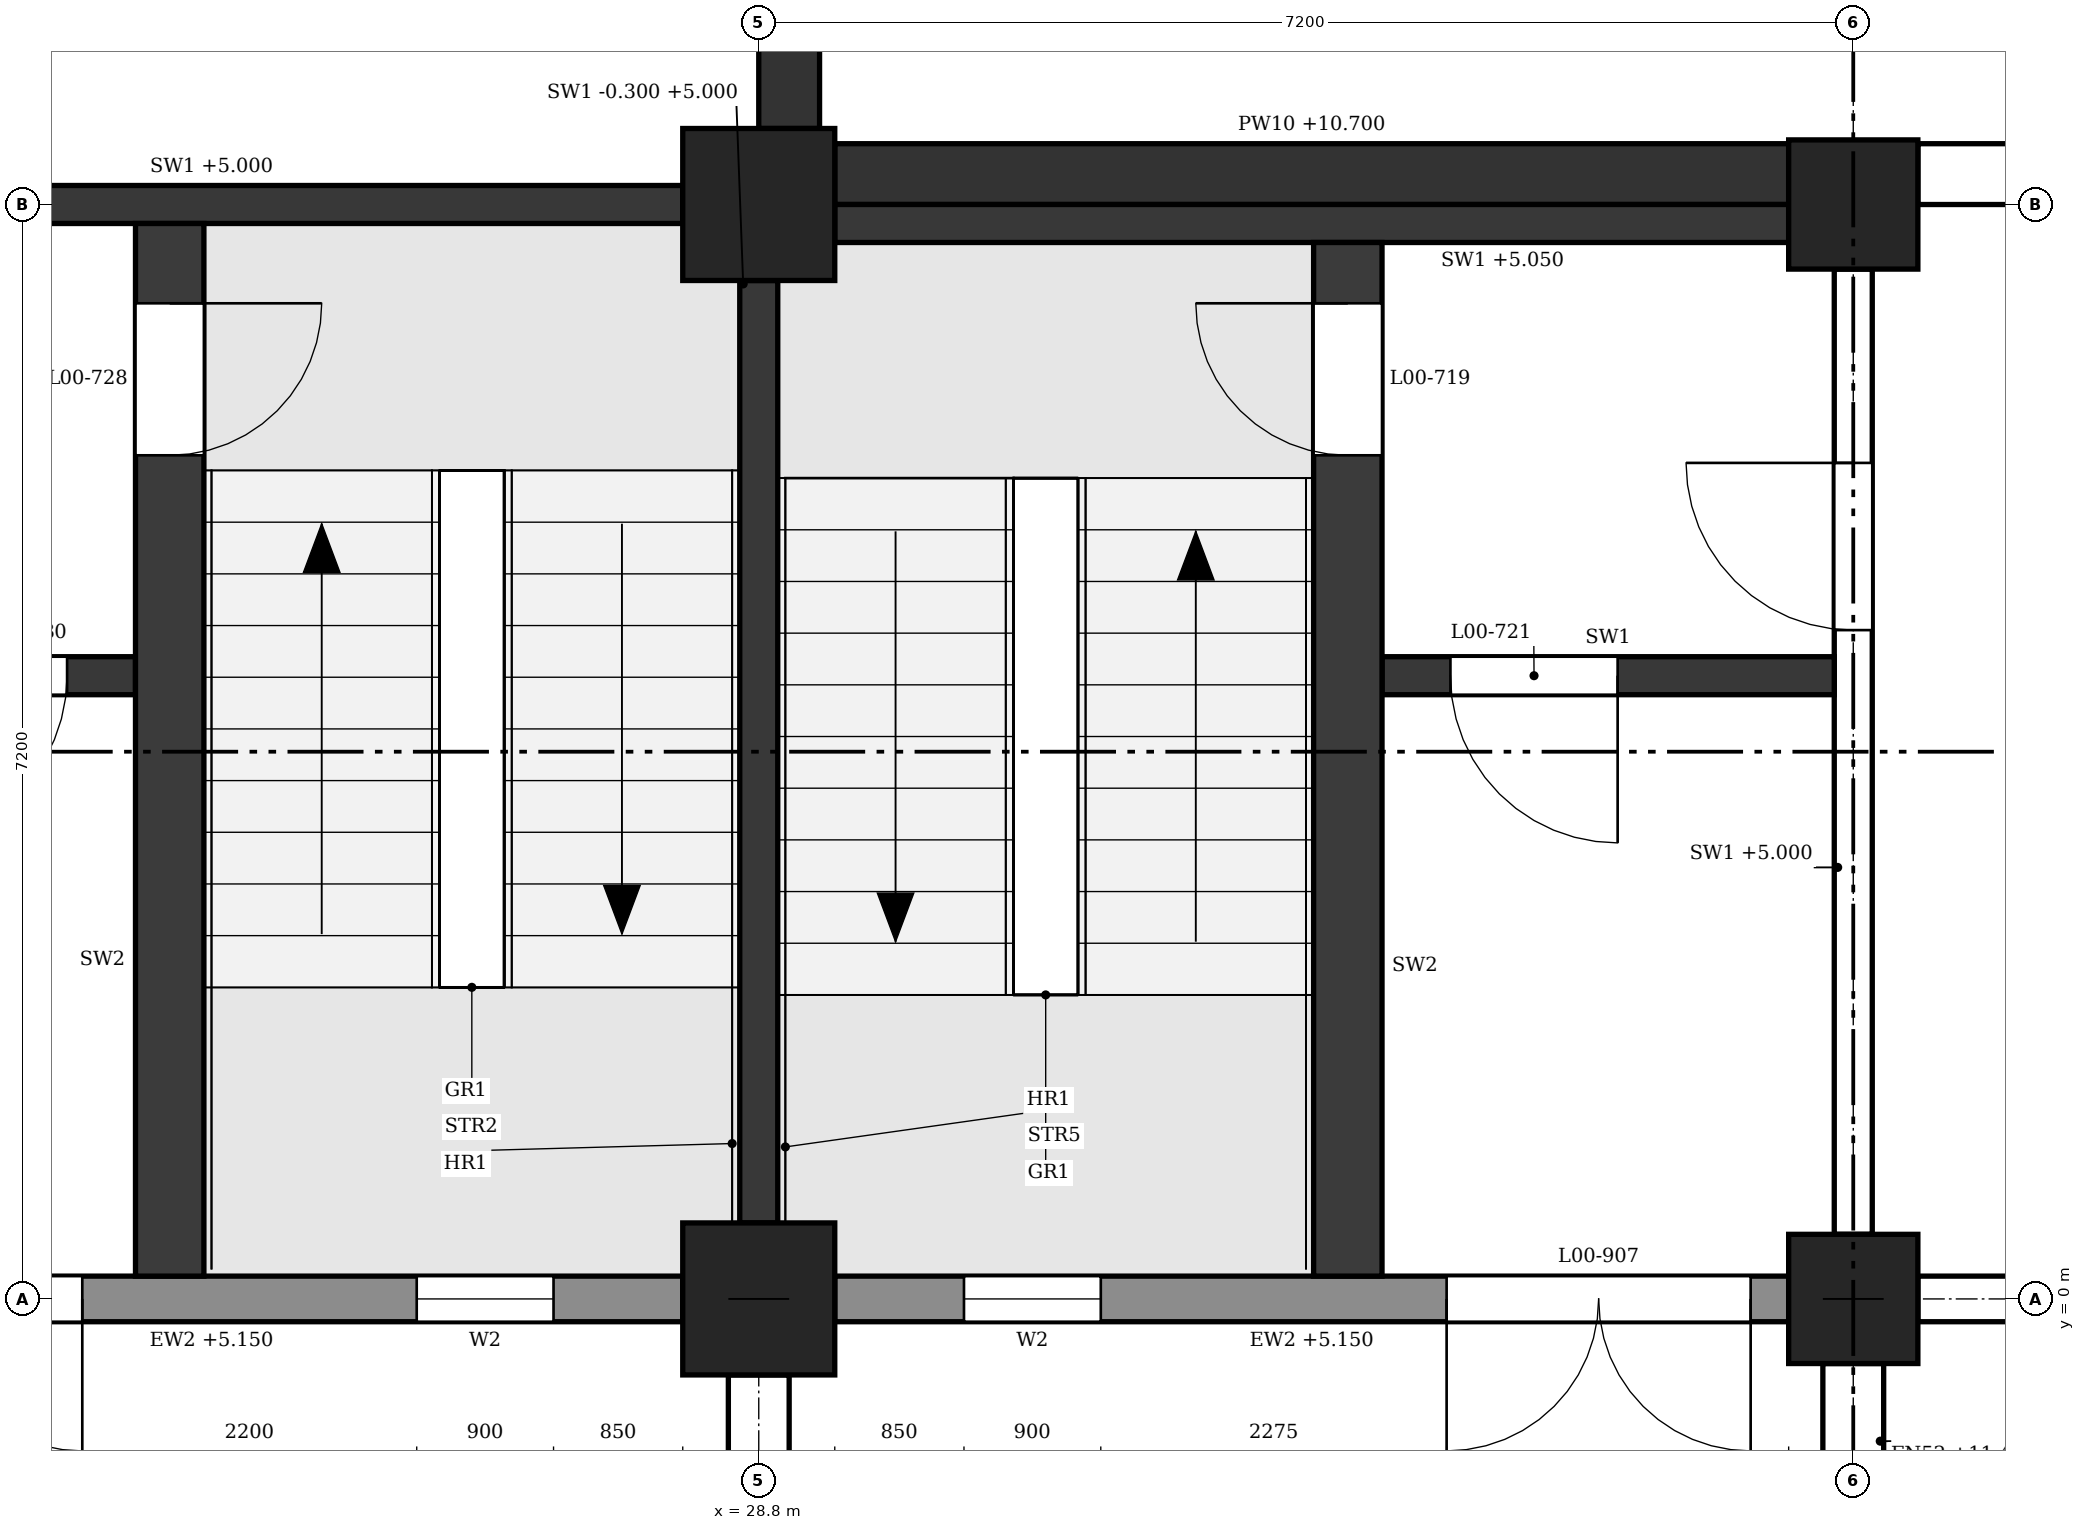
"""IFC4 building model, lengths in metres.
Left out: names, types, materials, properties, quantities, classifications, styles, units other than length and angle.
Written with IfcOpenShell. Run it as: python <this file> out.ifc"""

import sys

from ifc_helpers import new_model, si_unit, direction, frame, frame_2d, origin, origin_2d, place, context, subcontext, project, spatial, polyline, rectangle, outline, extrude, element, fill, save


model = new_model("IFC4")
c1 = context("Model", 3, precision=1e-05, world=origin(), true_north=direction((0.0, 1.0)))
c2 = subcontext(c1, "Body", "Model", "MODEL_VIEW")
j1 = project(units=[si_unit("LENGTHUNIT", "METRE"), si_unit("PLANEANGLEUNIT", "RADIAN")], contexts=[c1])
p1 = place(None, origin())
s1 = spatial("IfcSite", under=j1, at=p1, CompositionType="ELEMENT")
p2 = place(p1, origin())
s2 = spatial("IfcBuilding", under=s1, at=p2, CompositionType="ELEMENT")
p3 = place(p2, origin())
s3 = spatial("IfcBuildingStorey", under=s2, at=p3, CompositionType="ELEMENT", Elevation=0.0)
for number, where, z_axis, x_axis in (
    (1, (28.8, 0.0, 0.0), (0.0, 0.0, 1.0), (1.0, 0.0, 0.0)),
    (2, (28.8, 7.2, 0.0), (0.0, 0.0, 1.0), (1.0, 0.0, 0.0)),
):
    element("IfcColumn", number, at=place(p3, frame(where, z_axis=z_axis, x_axis=x_axis)), inside=s3, PredefinedType="COLUMN", context=c2, shape_type="SweptSolid", body=[
        extrude(rectangle(XDim=1.0, YDim=1.0, at=origin_2d()), origin(), (0.0, 0.0, 1.0), 6.0),
    ])
for number, where, z_axis, x_axis in (
    (3, (36.0, 0.0, 0.0), (0.0, 0.0, 1.0), (1.0, 0.0, 0.0)),
    (4, (36.0, 7.2, 0.0), (0.0, 0.0, 1.0), (1.0, 0.0, 0.0)),
):
    element("IfcColumn", number, at=place(p3, frame(where, z_axis=z_axis, x_axis=x_axis)), inside=s3, PredefinedType="COLUMN", context=c2, shape_type="SweptSolid", body=[
        extrude(rectangle(XDim=0.85, YDim=0.85, at=origin_2d()), origin(), (0.0, 0.0, 1.0), 6.0),
    ])
p4 = place(p3, frame((22.1, 0.0, 0.0), z_axis=(0.0, 0.0, 1.0), x_axis=(1.0, 0.0, 0.0)))
e5 = element("IfcWall", 5, at=p4, inside=s3, PredefinedType="STANDARD", context=c2, shape_type="SweptSolid", body=[
    extrude(rectangle(XDim=6.2, YDim=0.3, at=frame_2d((3.1, 0.0))), origin(), (0.0, 0.0, 1.0), 5.15),
])
p5 = place(p4, frame((0.25, 0.0, 0.0)))
e6 = element("IfcOpeningElement", 6, at=p5, cuts=e5, PredefinedType="OPENING", context=c2, shape_type="SweptSolid", body=[
    extrude(rectangle(XDim=2.0, YDim=2.1, at=frame_2d((1.0, 1.05))), frame((0.0, 0.16, 0.0), z_axis=(0.0, -1.0, 0.0), x_axis=(1.0, 0.0, 0.0)), (0.0, 0.0, 1.0), 0.32),
])
p6 = place(p4, frame((4.45, 0.0, 0.9)))
e7 = element("IfcOpeningElement", 7, at=p6, cuts=e5, PredefinedType="OPENING", context=c2, shape_type="SweptSolid", body=[
    extrude(outline(polyline([(0.0, 0.0), (0.9, 0.0), (0.9, 3.55), (0.45, 4.0), (0.0, 3.55), (0.0, 0.0)])), frame((0.0, 0.16, 0.0), z_axis=(0.0, -1.0, 0.0), x_axis=(1.0, 0.0, 0.0)), (0.0, 0.0, 1.0), 0.32),
])
p7 = place(p3, frame((29.3, 0.0, 0.0), z_axis=(0.0, 0.0, 1.0), x_axis=(1.0, 0.0, 0.0)))
e8 = element("IfcWall", 8, at=p7, inside=s3, PredefinedType="STANDARD", context=c2, shape_type="SweptSolid", body=[
    extrude(rectangle(XDim=6.275, YDim=0.3, at=frame_2d((3.137, 0.0))), origin(), (0.0, 0.0, 1.0), 5.15),
])
p8 = place(p7, frame((4.025, 0.0, 0.0)))
e9 = element("IfcOpeningElement", 9, at=p8, cuts=e8, PredefinedType="OPENING", context=c2, shape_type="SweptSolid", body=[
    extrude(rectangle(XDim=2.0, YDim=2.1, at=frame_2d((1.0, 1.05))), frame((0.0, 0.16, 0.0), z_axis=(0.0, -1.0, 0.0), x_axis=(1.0, 0.0, 0.0)), (0.0, 0.0, 1.0), 0.32),
])
p9 = place(p7, frame((0.85, 0.0, 0.9)))
e10 = element("IfcOpeningElement", 10, at=p9, cuts=e8, PredefinedType="OPENING", context=c2, shape_type="SweptSolid", body=[
    extrude(outline(polyline([(0.0, 0.0), (0.9, 0.0), (0.9, 3.55), (0.45, 4.0), (0.0, 3.55), (0.0, 0.0)])), frame((0.0, 0.16, 0.0), z_axis=(0.0, -1.0, 0.0), x_axis=(1.0, 0.0, 0.0)), (0.0, 0.0, 1.0), 0.32),
])
p10 = place(p3, frame((36.425, 0.0, 0.0), z_axis=(0.0, 0.0, 1.0), x_axis=(1.0, 0.0, 0.0)))
e11 = element("IfcWall", 11, at=p10, inside=s3, PredefinedType="STANDARD", context=c2, shape_type="SweptSolid", body=[
    extrude(rectangle(XDim=6.35, YDim=0.3, at=frame_2d((3.175, 0.0))), origin(), (0.0, 0.0, 1.0), 5.15),
])
p11 = place(p10, frame((1.975, 0.0, 0.0)))
e12 = element("IfcOpeningElement", 12, at=p11, cuts=e11, PredefinedType="OPENING", context=c2, shape_type="SweptSolid", body=[
    extrude(outline(polyline([(0.0, 0.0), (2.4, 0.0), (2.4, 2.0), (1.2, 3.2), (0.0, 2.0), (0.0, 0.0)])), frame((0.0, 0.16, 0.0), z_axis=(0.0, -1.0, 0.0), x_axis=(1.0, 0.0, 0.0)), (0.0, 0.0, 1.0), 0.32),
])
p12 = place(p3, frame((28.8, -0.5, 0.0), z_axis=(0.0, 0.0, 1.0), x_axis=(0.0, -1.0, 0.0)))
e13 = element("IfcWall", 13, at=p12, inside=s3, PredefinedType="POLYGONAL", context=c2, shape_type="SweptSolid", body=[
    extrude(outline(polyline([(1.2, 0.0), (1.2, 20.825), (0.85, 21.35), (0.0, 21.35), (0.0, 0.0), (1.2, 0.0)])), frame((0.0, 0.2, 0.0), z_axis=(0.0, -1.0, 0.0), x_axis=(1.0, 0.0, 0.0)), (0.0, 0.0, 1.0), 0.4),
])
p13 = place(p3, frame((36.0, -0.425, 0.0), z_axis=(0.0, 0.0, 1.0), x_axis=(0.0, -1.0, 0.0)))
e14 = element("IfcWall", 14, at=p13, inside=s3, PredefinedType="POLYGONAL", context=c2, shape_type="SweptSolid", body=[
    extrude(outline(polyline([(1.2, 0.0), (1.2, 9.825), (0.15, 11.4), (0.0, 11.4), (0.0, 0.0), (1.2, 0.0)])), frame((0.0, 0.2, 0.0), z_axis=(0.0, -1.0, 0.0), x_axis=(1.0, 0.0, 0.0)), (0.0, 0.0, 1.0), 0.4),
])
p14 = place(p3, frame((29.3, 7.075, 0.0), z_axis=(0.0, 0.0, 1.0), x_axis=(1.0, 0.0, 0.0)))
e15 = element("IfcWall", 15, at=p14, inside=s3, PredefinedType="SHEAR", context=c2, shape_type="SweptSolid", body=[
    extrude(rectangle(XDim=6.275, YDim=0.25, at=frame_2d((3.137, 0.0))), origin(), (0.0, 0.0, 1.0), 5.05),
])
p15 = place(p3, frame((28.8, 0.5, -0.3), z_axis=(0.0, 0.0, 1.0), x_axis=(0.0, 1.0, 0.0)))
e16 = element("IfcWall", 16, at=p15, inside=s3, PredefinedType="SHEAR", context=c2, shape_type="SweptSolid", body=[
    extrude(rectangle(XDim=6.2, YDim=0.25, at=frame_2d((3.1, 0.0))), origin(), (0.0, 0.0, 1.0), 5.3),
])
p16 = place(p3, frame((36.0, 0.425, 0.0), z_axis=(0.0, 0.0, 1.0), x_axis=(0.0, 1.0, 0.0)))
e17 = element("IfcWall", 17, at=p16, inside=s3, PredefinedType="SHEAR", context=c2, shape_type="SweptSolid", body=[
    extrude(rectangle(XDim=6.35, YDim=0.25, at=frame_2d((3.175, 0.0))), origin(), (0.0, 0.0, 1.0), 5.0),
])
p17 = place(p16, frame((3.975, 0.0, 0.0)))
e18 = element("IfcOpeningElement", 18, at=p17, cuts=e17, PredefinedType="OPENING", context=c2, shape_type="SweptSolid", body=[
    extrude(rectangle(XDim=1.1, YDim=2.1, at=frame_2d((0.55, 1.05))), frame((0.0, 0.135, 0.0), z_axis=(0.0, -1.0, 0.0), x_axis=(1.0, 0.0, 0.0)), (0.0, 0.0, 1.0), 0.27),
])
p18 = place(p3, frame((32.675, 0.15, 0.0), z_axis=(0.0, 0.0, 1.0), x_axis=(0.0, 1.0, 0.0)))
e19 = element("IfcWall", 19, at=p18, inside=s3, PredefinedType="SHEAR", context=c2, shape_type="SweptSolid", body=[
    extrude(rectangle(XDim=6.8, YDim=0.45, at=frame_2d((3.4, 0.0))), origin(), (0.0, 0.0, 1.0), 5.75),
])
p19 = place(p18, frame((5.4, 0.0, 0.0)))
e20 = element("IfcOpeningElement", 20, at=p19, cuts=e19, PredefinedType="OPENING", context=c2, shape_type="SweptSolid", body=[
    extrude(rectangle(XDim=1.0, YDim=2.1, at=frame_2d((0.5, 1.05))), frame((0.0, 0.235, 0.0), z_axis=(0.0, -1.0, 0.0), x_axis=(1.0, 0.0, 0.0)), (0.0, 0.0, 1.0), 0.47),
])
p20 = place(p3, frame((32.9, 4.1, 0.0), z_axis=(0.0, 0.0, 1.0), x_axis=(1.0, 0.0, 0.0)))
e21 = element("IfcWall", 21, at=p20, inside=s3, PredefinedType="SHEAR", context=c2, shape_type="SweptSolid", body=[
    extrude(rectangle(XDim=2.975, YDim=0.25, at=frame_2d((1.488, 0.0))), origin(), (0.0, 0.0, 1.0), 5.75),
])
p21 = place(p20, frame((0.45, 0.0, 0.0)))
e22 = element("IfcOpeningElement", 22, at=p21, cuts=e21, PredefinedType="OPENING", context=c2, shape_type="SweptSolid", body=[
    extrude(rectangle(XDim=1.1, YDim=2.1, at=frame_2d((0.55, 1.05))), frame((0.0, 0.135, 0.0), z_axis=(0.0, -1.0, 0.0), x_axis=(1.0, 0.0, 0.0)), (0.0, 0.0, 1.0), 0.27),
])
p22 = place(p3, frame((22.1, 7.2, 0.0), z_axis=(0.0, 0.0, 1.0), x_axis=(1.0, 0.0, 0.0)))
e23 = element("IfcWall", 23, at=p22, inside=s3, PredefinedType="SHEAR", context=c2, shape_type="SweptSolid", body=[
    extrude(rectangle(XDim=6.2, YDim=0.25, at=frame_2d((3.1, 0.0))), origin(), (0.0, 0.0, 1.0), 5.0),
])
p23 = place(p22, frame((0.35, 0.0, 0.0)))
e24 = element("IfcOpeningElement", 24, at=p23, cuts=e23, PredefinedType="OPENING", context=c2, shape_type="SweptSolid", body=[
    extrude(rectangle(XDim=1.1, YDim=2.1, at=frame_2d((0.55, 1.05))), frame((0.0, 0.135, 0.0), z_axis=(0.0, -1.0, 0.0), x_axis=(1.0, 0.0, 0.0)), (0.0, 0.0, 1.0), 0.27),
])
p24 = place(p3, frame((24.925, 0.15, 0.0), z_axis=(0.0, 0.0, 1.0), x_axis=(0.0, 1.0, 0.0)))
e25 = element("IfcWall", 25, at=p24, inside=s3, PredefinedType="SHEAR", context=c2, shape_type="SweptSolid", body=[
    extrude(rectangle(XDim=6.925, YDim=0.45, at=frame_2d((3.462, 0.0))), origin(), (0.0, 0.0, 1.0), 5.75),
])
p25 = place(p24, frame((5.4, 0.0, 0.0)))
e26 = element("IfcOpeningElement", 26, at=p25, cuts=e25, PredefinedType="OPENING", context=c2, shape_type="SweptSolid", body=[
    extrude(rectangle(XDim=1.0, YDim=2.1, at=frame_2d((0.5, 1.05))), frame((0.0, 0.235, 0.0), z_axis=(0.0, -1.0, 0.0), x_axis=(1.0, 0.0, 0.0)), (0.0, 0.0, 1.0), 0.47),
])
p26 = place(p3, frame((21.725, 4.1, 0.0), z_axis=(0.0, 0.0, 1.0), x_axis=(1.0, 0.0, 0.0)))
e27 = element("IfcWall", 27, at=p26, inside=s3, PredefinedType="SHEAR", context=c2, shape_type="SweptSolid", body=[
    extrude(rectangle(XDim=2.975, YDim=0.25, at=frame_2d((1.487, 0.0))), origin(), (0.0, 0.0, 1.0), 5.75),
])
p27 = place(p26, frame((1.425, 0.0, 0.0)))
e28 = element("IfcOpeningElement", 28, at=p27, cuts=e27, PredefinedType="OPENING", context=c2, shape_type="SweptSolid", body=[
    extrude(rectangle(XDim=1.1, YDim=2.1, at=frame_2d((0.55, 1.05))), frame((0.0, 0.135, 0.0), z_axis=(0.0, -1.0, 0.0), x_axis=(1.0, 0.0, 0.0)), (0.0, 0.0, 1.0), 0.27),
])
p28 = place(p3, frame((29.3, 7.4, 0.0), z_axis=(0.0, 0.0, 1.0), x_axis=(1.0, 0.0, 0.0)))
e29 = element("IfcWall", 29, at=p28, inside=s3, PredefinedType="SOLIDWALL", context=c2, shape_type="SweptSolid", body=[
    extrude(rectangle(XDim=6.275, YDim=0.4, at=frame_2d((3.137, 0.0))), origin(), (0.0, 0.0, 1.0), 10.7),
])
p29 = place(p3, frame((36.425, 7.4, 0.0), z_axis=(0.0, 0.0, 1.0), x_axis=(1.0, 0.0, 0.0)))
e30 = element("IfcWall", 30, at=p29, inside=s3, PredefinedType="SOLIDWALL", context=c2, shape_type="SweptSolid", body=[
    extrude(rectangle(XDim=6.35, YDim=0.4, at=frame_2d((3.175, 0.0))), origin(), (0.0, 0.0, 1.0), 10.7),
])
p30 = place(p3, frame((29.0, 7.7, 0.0), z_axis=(0.0, 0.0, 1.0), x_axis=(0.0, 1.0, 0.0)))
e31 = element("IfcWall", 31, at=p30, inside=s3, PredefinedType="SOLIDWALL", context=c2, shape_type="SweptSolid", body=[
    extrude(rectangle(XDim=6.2, YDim=0.4, at=frame_2d((3.1, 0.0))), origin(), (0.0, 0.0, 1.0), 10.55),
])
p31 = place(p5, frame((2.0, 0.0, 0.0), z_axis=(0.0, 0.0, 1.0), x_axis=(-1.0, 0.0, 0.0)))
e32 = element("IfcDoor", 32, at=p31, inside=s3, OperationType="DOUBLE_DOOR_SINGLE_SWING", PredefinedType="DOOR", context=c2, shape_type="SweptSolid", body=[
    extrude(rectangle(XDim=2.0, YDim=2.1, at=frame_2d((1.0, 1.05))), frame((0.0, 0.025, 0.0), z_axis=(0.0, -1.0, 0.0), x_axis=(1.0, 0.0, 0.0)), (0.0, 0.0, 1.0), 0.05),
])
fill(e6, e32)
p32 = place(p8, frame((2.0, 0.0, 0.0), z_axis=(0.0, 0.0, 1.0), x_axis=(-1.0, 0.0, 0.0)))
e33 = element("IfcDoor", 33, at=p32, inside=s3, OperationType="DOUBLE_DOOR_SINGLE_SWING", PredefinedType="DOOR", context=c2, shape_type="SweptSolid", body=[
    extrude(rectangle(XDim=2.0, YDim=2.1, at=frame_2d((1.0, 1.05))), frame((0.0, 0.025, 0.0), z_axis=(0.0, -1.0, 0.0), x_axis=(1.0, 0.0, 0.0)), (0.0, 0.0, 1.0), 0.05),
])
fill(e9, e33)
p33 = place(p9, origin())
e34 = element("IfcWindow", 34, at=p33, inside=s3, PartitioningType="SINGLE_PANEL", PredefinedType="WINDOW", context=c2, shape_type="SweptSolid", body=[
    extrude(outline(polyline([(0.0, 0.0), (0.9, 0.0), (0.9, 3.55), (0.45, 4.0), (0.0, 3.55), (0.0, 0.0)])), frame((0.0, 0.03, 0.0), z_axis=(0.0, -1.0, 0.0), x_axis=(1.0, 0.0, 0.0)), (0.0, 0.0, 1.0), 0.06),
])
fill(e10, e34)
p34 = place(p6, origin())
e35 = element("IfcWindow", 35, at=p34, inside=s3, PartitioningType="SINGLE_PANEL", PredefinedType="WINDOW", context=c2, shape_type="SweptSolid", body=[
    extrude(outline(polyline([(0.0, 0.0), (0.9, 0.0), (0.9, 3.55), (0.45, 4.0), (0.0, 3.55), (0.0, 0.0)])), frame((0.0, 0.03, 0.0), z_axis=(0.0, -1.0, 0.0), x_axis=(1.0, 0.0, 0.0)), (0.0, 0.0, 1.0), 0.06),
])
fill(e7, e35)
p35 = place(p19, origin())
e36 = element("IfcDoor", 36, at=p35, inside=s3, OperationType="SINGLE_SWING_RIGHT", PredefinedType="DOOR", context=c2, shape_type="SweptSolid", body=[
    extrude(rectangle(XDim=1.0, YDim=2.1, at=frame_2d((0.5, 1.05))), frame((0.0, 0.025, 0.0), z_axis=(0.0, -1.0, 0.0), x_axis=(1.0, 0.0, 0.0)), (0.0, 0.0, 1.0), 0.05),
])
fill(e20, e36)
p36 = place(p17, origin())
e37 = element("IfcDoor", 37, at=p36, inside=s3, OperationType="SINGLE_SWING_RIGHT", PredefinedType="DOOR", context=c2, shape_type="SweptSolid", body=[
    extrude(rectangle(XDim=1.1, YDim=2.1, at=frame_2d((0.55, 1.05))), frame((0.0, 0.025, 0.0), z_axis=(0.0, -1.0, 0.0), x_axis=(1.0, 0.0, 0.0)), (0.0, 0.0, 1.0), 0.05),
])
fill(e18, e37)
p37 = place(p21, frame((1.1, 0.0, 0.0), z_axis=(0.0, 0.0, 1.0), x_axis=(-1.0, 0.0, 0.0)))
e38 = element("IfcDoor", 38, at=p37, inside=s3, OperationType="SINGLE_SWING_LEFT", PredefinedType="DOOR", context=c2, shape_type="SweptSolid", body=[
    extrude(rectangle(XDim=1.1, YDim=2.1, at=frame_2d((0.55, 1.05))), frame((0.0, 0.025, 0.0), z_axis=(0.0, -1.0, 0.0), x_axis=(1.0, 0.0, 0.0)), (0.0, 0.0, 1.0), 0.05),
])
fill(e22, e38)
p38 = place(p25, frame((1.0, 0.0, 0.0), z_axis=(0.0, 0.0, 1.0), x_axis=(-1.0, 0.0, 0.0)))
e39 = element("IfcDoor", 39, at=p38, inside=s3, OperationType="SINGLE_SWING_LEFT", PredefinedType="DOOR", context=c2, shape_type="SweptSolid", body=[
    extrude(rectangle(XDim=1.0, YDim=2.1, at=frame_2d((0.5, 1.05))), frame((0.0, 0.025, 0.0), z_axis=(0.0, -1.0, 0.0), x_axis=(1.0, 0.0, 0.0)), (0.0, 0.0, 1.0), 0.05),
])
fill(e26, e39)
p39 = place(p27, frame((1.1, 0.0, 0.0), z_axis=(0.0, 0.0, 1.0), x_axis=(-1.0, 0.0, 0.0)))
e40 = element("IfcDoor", 40, at=p39, inside=s3, OperationType="SINGLE_SWING_RIGHT", PredefinedType="DOOR", context=c2, shape_type="SweptSolid", body=[
    extrude(rectangle(XDim=1.1, YDim=2.1, at=frame_2d((0.55, 1.05))), frame((0.0, 0.025, 0.0), z_axis=(0.0, -1.0, 0.0), x_axis=(1.0, 0.0, 0.0)), (0.0, 0.0, 1.0), 0.05),
])
fill(e28, e40)
save(model, sys.argv[1])
